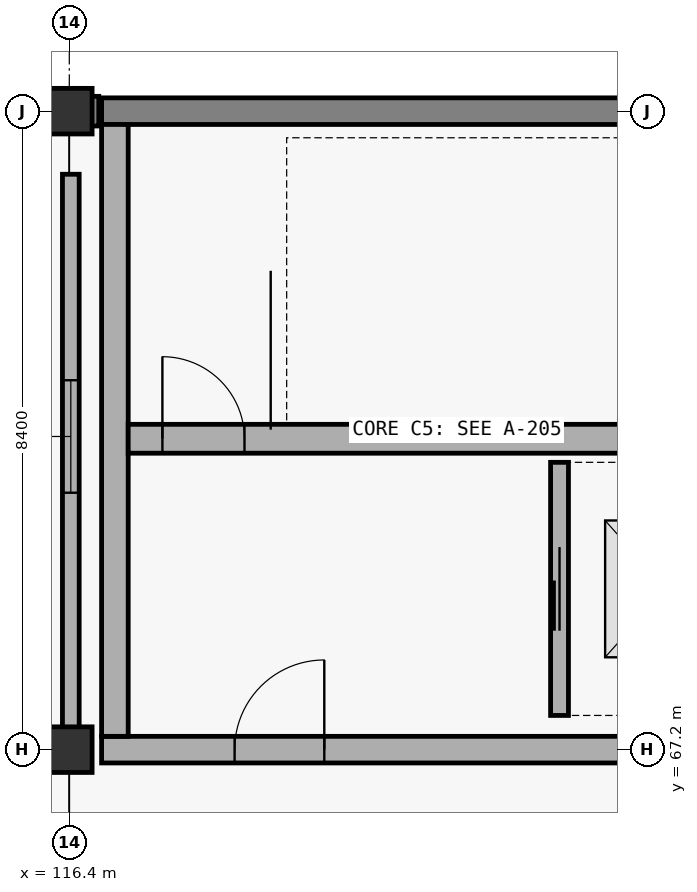
"""IFC4 building model, lengths in metres.
Left out: names, types, materials, properties, quantities, classifications, styles, units other than length and angle.
Written with IfcOpenShell. Run it as: python <this file> out.ifc"""

import sys

from ifc_helpers import new_model, si_unit, direction, frame, frame_2d, origin, origin_2d, place, context, subcontext, project, spatial, rectangle, extrude, element, fill, save


model = new_model("IFC4")
c1 = context("Model", 3, precision=1e-05, world=origin(), true_north=direction((0.0, 1.0)))
c2 = subcontext(c1, "Body", "Model", "MODEL_VIEW")
j1 = project(units=[si_unit("LENGTHUNIT", "METRE"), si_unit("PLANEANGLEUNIT", "RADIAN")], contexts=[c1])
p1 = place(None, origin())
s1 = spatial("IfcSite", under=j1, at=p1, CompositionType="ELEMENT")
p2 = place(p1, origin())
s2 = spatial("IfcBuilding", under=s1, at=p2, CompositionType="ELEMENT")
p3 = place(p2, frame((0.0, 0.0, 15.6)))
s3 = spatial("IfcBuildingStorey", under=s2, at=p3, CompositionType="ELEMENT", Elevation=15.6)
for number, where, z_axis, x_axis in (
    (1, (116.4, 67.2, 0.0), (0.0, 0.0, 1.0), (1.0, 0.0, 0.0)),
    (2, (116.4, 75.6, 0.0), (0.0, 0.0, 1.0), (1.0, 0.0, 0.0)),
):
    element("IfcColumn", number, at=place(p3, frame(where, z_axis=z_axis, x_axis=x_axis)), inside=s3, PredefinedType="COLUMN", context=c2, shape_type="SweptSolid", body=[
        extrude(rectangle(XDim=0.6, YDim=0.6, at=origin_2d()), origin(), (0.0, 0.0, 1.0), 5.1),
    ])
p4 = place(p3, frame((116.825, 67.2, 0.0), z_axis=(0.0, 0.0, 1.0), x_axis=(1.0, 0.0, 0.0)))
e3 = element("IfcWall", 3, at=p4, inside=s3, PredefinedType="SHEAR", context=c2, shape_type="SweptSolid", body=[
    extrude(rectangle(XDim=9.35, YDim=0.35, at=frame_2d((4.675, 0.0))), origin(), (0.0, 0.0, 1.0), 5.1),
])
p5 = place(p4, frame((1.75, 0.0, 0.0)))
e4 = element("IfcOpeningElement", 4, at=p5, cuts=e3, PredefinedType="OPENING", context=c2, shape_type="SweptSolid", body=[
    extrude(rectangle(XDim=1.18, YDim=2.24, at=frame_2d((0.59, 1.12))), frame((0.0, 0.185, 0.0), z_axis=(0.0, -1.0, 0.0), x_axis=(1.0, 0.0, 0.0)), (0.0, 0.0, 1.0), 0.37),
])
p6 = place(p3, frame((116.825, 75.6, 0.0), z_axis=(0.0, 0.0, 1.0), x_axis=(1.0, 0.0, 0.0)))
e5 = element("IfcWall", 5, at=p6, inside=s3, PredefinedType="SHEAR", context=c2, shape_type="SweptSolid", body=[
    extrude(rectangle(XDim=9.35, YDim=0.35, at=frame_2d((4.675, 0.0))), origin(), (0.0, 0.0, 1.0), 5.1),
])
p7 = place(p3, frame((117.0, 67.375, 0.0), z_axis=(0.0, 0.0, 1.0), x_axis=(0.0, 1.0, 0.0)))
e6 = element("IfcWall", 6, at=p7, inside=s3, PredefinedType="SHEAR", context=c2, shape_type="SweptSolid", body=[
    extrude(rectangle(XDim=8.05, YDim=0.35, at=frame_2d((4.025, 0.0))), origin(), (0.0, 0.0, 1.0), 5.1),
])
p8 = place(p3, frame((117.175, 71.29, 0.0), z_axis=(0.0, 0.0, 1.0), x_axis=(1.0, 0.0, 0.0)))
e7 = element("IfcWall", 7, at=p8, inside=s3, PredefinedType="SHEAR", context=c2, shape_type="SweptSolid", body=[
    extrude(rectangle(XDim=8.65, YDim=0.38, at=frame_2d((4.325, 0.0))), origin(), (0.0, 0.0, 1.0), 5.1),
])
p9 = place(p8, frame((0.45, 0.0, 0.0)))
e8 = element("IfcOpeningElement", 8, at=p9, cuts=e7, PredefinedType="OPENING", context=c2, shape_type="SweptSolid", body=[
    extrude(rectangle(XDim=1.08, YDim=2.18, at=frame_2d((0.54, 1.09))), frame((0.0, 0.2, 0.0), z_axis=(0.0, -1.0, 0.0), x_axis=(1.0, 0.0, 0.0)), (0.0, 0.0, 1.0), 0.4),
])
p10 = place(p3, frame((108.302, 75.6, 0.0), z_axis=(0.0, 0.0, 1.0), x_axis=(1.0, 0.0, 0.0)))
e9 = element("IfcWall", 9, at=p10, inside=s3, PredefinedType="SOLIDWALL", context=c2, shape_type="SweptSolid", body=[
    extrude(rectangle(XDim=8.486, YDim=0.39, at=frame_2d((4.243, 0.0))), origin(), (0.0, 0.0, 1.0), 3.81),
])
p11 = place(p10, frame((1.218, 0.0, 0.85)))
e10 = element("IfcOpeningElement", 10, at=p11, cuts=e9, PredefinedType="OPENING", context=c2, shape_type="SweptSolid", body=[
    extrude(rectangle(XDim=1.6, YDim=2.5, at=frame_2d((0.8, 1.25))), frame((0.0, 0.205, 0.0), z_axis=(0.0, -1.0, 0.0), x_axis=(1.0, 0.0, 0.0)), (0.0, 0.0, 1.0), 0.41),
])
p12 = place(p10, frame((4.118, 0.0, 0.85)))
e11 = element("IfcOpeningElement", 11, at=p12, cuts=e9, PredefinedType="OPENING", context=c2, shape_type="SweptSolid", body=[
    extrude(rectangle(XDim=1.95, YDim=2.3, at=frame_2d((0.975, 1.15))), frame((0.0, 0.205, 0.0), z_axis=(0.0, -1.0, 0.0), x_axis=(1.0, 0.0, 0.0)), (0.0, 0.0, 1.0), 0.41),
])
p13 = place(p3, frame((122.85, 67.65, 0.0), z_axis=(0.0, 0.0, 1.0), x_axis=(0.0, 1.0, 0.0)))
e12 = element("IfcWall", 12, at=p13, inside=s3, PredefinedType="PARTITIONING", context=c2, shape_type="SweptSolid", body=[
    extrude(rectangle(XDim=3.33, YDim=0.235, at=frame_2d((1.665, 0.0))), origin(), (0.0, 0.0, 1.0), 4.72),
])
p14 = place(p13, frame((1.115, 0.0, 0.0)))
e13 = element("IfcOpeningElement", 13, at=p14, cuts=e12, PredefinedType="OPENING", context=c2, shape_type="SweptSolid", body=[
    extrude(rectangle(XDim=1.1, YDim=2.2, at=frame_2d((0.55, 1.1))), frame((0.0, 0.127, 0.0), z_axis=(0.0, -1.0, 0.0), x_axis=(1.0, 0.0, 0.0)), (0.0, 0.0, 1.0), 0.255),
])
p15 = place(p3, frame((116.42, 67.43, 0.0), z_axis=(0.0, 0.0, 1.0), x_axis=(0.0, 1.0, 0.0)))
e14 = element("IfcWall", 14, at=p15, inside=s3, PredefinedType="PARTITIONING", context=c2, shape_type="SweptSolid", body=[
    extrude(rectangle(XDim=7.34, YDim=0.22, at=frame_2d((3.67, 0.0))), origin(), (0.0, 0.0, 1.0), 3.81),
])
p16 = place(p15, frame((3.15, 0.0, 0.9)))
e15 = element("IfcOpeningElement", 15, at=p16, cuts=e14, PredefinedType="OPENING", context=c2, shape_type="SweptSolid", body=[
    extrude(rectangle(XDim=1.48, YDim=1.35, at=frame_2d((0.74, 0.675))), frame((0.0, 0.12, 0.0), z_axis=(0.0, -1.0, 0.0), x_axis=(1.0, 0.0, 0.0)), (0.0, 0.0, 1.0), 0.24),
])
p17 = place(p9, origin())
e16 = element("IfcDoor", 16, at=p17, inside=s3, OperationType="SINGLE_SWING_LEFT", PredefinedType="DOOR", context=c2, shape_type="SweptSolid", body=[
    extrude(rectangle(XDim=1.08, YDim=2.18, at=frame_2d((0.54, 1.09))), frame((0.0, 0.025, 0.0), z_axis=(0.0, -1.0, 0.0), x_axis=(1.0, 0.0, 0.0)), (0.0, 0.0, 1.0), 0.05),
])
fill(e8, e16)
p18 = place(p5, origin())
e17 = element("IfcDoor", 17, at=p18, inside=s3, OperationType="SINGLE_SWING_RIGHT", PredefinedType="DOOR", context=c2, shape_type="SweptSolid", body=[
    extrude(rectangle(XDim=1.18, YDim=2.24, at=frame_2d((0.59, 1.12))), frame((0.0, 0.025, 0.0), z_axis=(0.0, -1.0, 0.0), x_axis=(1.0, 0.0, 0.0)), (0.0, 0.0, 1.0), 0.05),
])
fill(e4, e17)
p19 = place(p14, origin())
e18 = element("IfcDoor", 18, at=p19, inside=s3, OperationType="SLIDING_TO_LEFT", PredefinedType="DOOR", context=c2, shape_type="SweptSolid", body=[
    extrude(rectangle(XDim=1.1, YDim=2.2, at=frame_2d((0.55, 1.1))), frame((0.0, 0.025, 0.0), z_axis=(0.0, -1.0, 0.0), x_axis=(1.0, 0.0, 0.0)), (0.0, 0.0, 1.0), 0.05),
])
fill(e13, e18)
p20 = place(p16, origin())
e19 = element("IfcWindow", 19, at=p20, inside=s3, PartitioningType="SINGLE_PANEL", PredefinedType="WINDOW", context=c2, shape_type="SweptSolid", body=[
    extrude(rectangle(XDim=1.48, YDim=1.35, at=frame_2d((0.74, 0.675))), frame((0.0, 0.03, 0.0), z_axis=(0.0, -1.0, 0.0), x_axis=(1.0, 0.0, 0.0)), (0.0, 0.0, 1.0), 0.06),
])
fill(e15, e19)
save(model, sys.argv[1])
